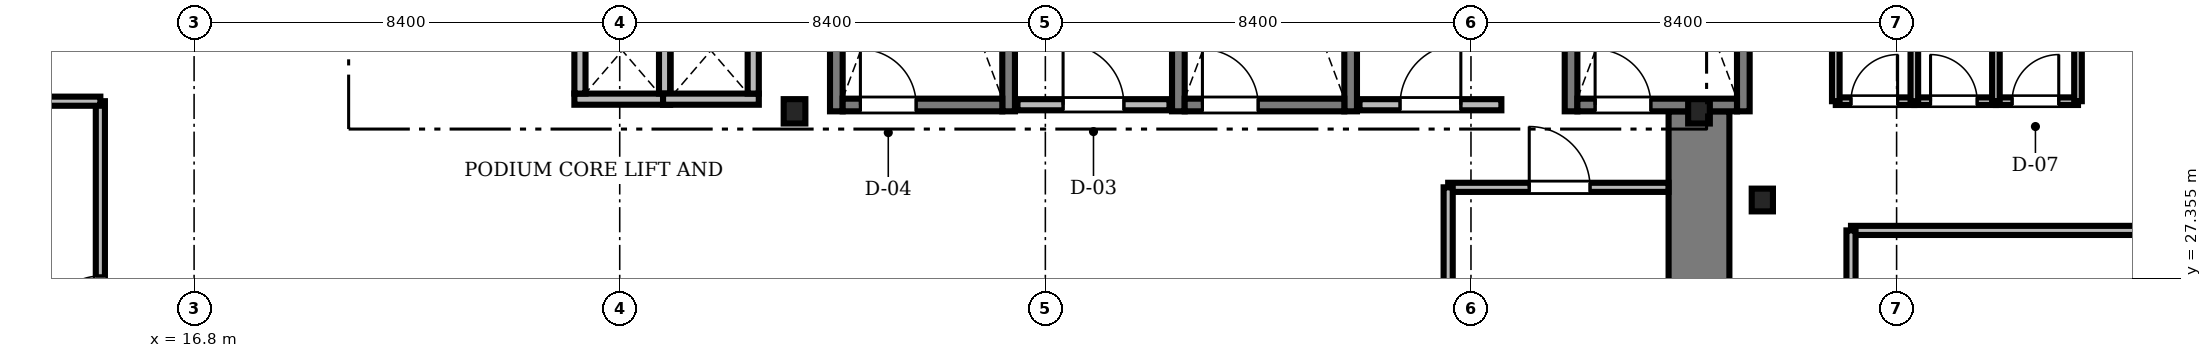
"""IFC4 building model, lengths in metres.
Left out: names, types, materials, properties, quantities, classifications, styles, units other than length and angle.
Written with IfcOpenShell. Run it as: python <this file> out.ifc"""

import sys

from ifc_helpers import new_model, si_unit, direction, frame, frame_2d, origin, origin_2d, place, context, subcontext, project, spatial, rectangle, i_section, extrude, source, transform, mapped, element, fill, save


model = new_model("IFC4")
c1 = context("Model", 3, precision=1e-05, world=origin(), true_north=direction((0.0, 1.0)))
c2 = subcontext(c1, "Body", "Model", "MODEL_VIEW")
j1 = project(units=[si_unit("LENGTHUNIT", "METRE"), si_unit("PLANEANGLEUNIT", "RADIAN")], contexts=[c1])
p1 = place(None, origin())
s1 = spatial("IfcSite", under=j1, at=p1, CompositionType="ELEMENT")
p2 = place(p1, origin())
s2 = spatial("IfcBuilding", under=s1, at=p2, CompositionType="ELEMENT")
p3 = place(p2, frame((0.0, 0.0, 17.0)))
s3 = spatial("IfcBuildingStorey", under=s2, at=p3, CompositionType="ELEMENT", Elevation=17.0)
m1 = source(origin(), c2, "Body", "SweptSolid", [
    extrude(rectangle(XDim=13.15, YDim=1.2, at=frame_2d((6.575, 0.0))), origin(), (0.0, 0.0, 1.0), 5.08),
])
p4 = place(p3, frame((46.5, 17.5, 0.0), z_axis=(0.0, 0.0, 1.0), x_axis=(0.0, 1.0, 0.0)))
e1 = element("IfcWall", 1, at=p4, inside=s3, PredefinedType="SHEAR", context=c2, shape_type="MappedRepresentation", body=[
    mapped(m1, transform((0.0, 0.0, 0.0), scale=1.0)),
])
m2 = source(origin(), c2, "Body", "SweptSolid", [
    extrude(i_section(OverallWidth=0.428, OverallDepth=0.481, WebThickness=0.04, FlangeThickness=0.063, FilletRadius=0.015, at=origin_2d()), origin(), (0.0, 0.0, 1.0), 5.08),
])
for number, where, z_axis, x_axis in (
    (2, (28.65, 30.65, 0.0), (0.0, 0.0, 1.0), (1.0, 0.0, 0.0)),
    (3, (46.5, 30.65, 0.0), (0.0, 0.0, 1.0), (1.0, 0.0, 0.0)),
):
    element("IfcColumn", number, at=place(p3, frame(where, z_axis=z_axis, x_axis=x_axis)), inside=s3, PredefinedType="COLUMN", context=c2, shape_type="MappedRepresentation", body=[
        mapped(m2, transform((0.0, 0.0, 0.0), scale=1.0)),
    ])
m3 = source(origin(), c2, "Body", "SweptSolid", [
    extrude(i_section(OverallWidth=0.419, OverallDepth=0.449, WebThickness=0.031, FlangeThickness=0.048, FilletRadius=0.015, at=origin_2d()), origin(), (0.0, 0.0, 1.0), 5.08),
])
p5 = place(p3, frame((47.75, 28.9, 0.0), z_axis=(0.0, 0.0, 1.0), x_axis=(1.0, 0.0, 0.0)))
e4 = element("IfcColumn", 4, at=p5, inside=s3, PredefinedType="COLUMN", context=c2, shape_type="MappedRepresentation", body=[
    mapped(m3, transform((0.0, 0.0, 0.0), scale=1.0)),
])
m4 = source(origin(), c2, "Body", "SweptSolid", [
    extrude(rectangle(XDim=9.05, YDim=0.25, at=frame_2d((4.525, 0.0))), origin(), (0.0, 0.0, 1.0), 5.2),
])
for number, where, z_axis, x_axis in (
    (5, (29.475, 30.65, 0.0), (0.0, 0.0, 1.0), (0.0, 1.0, 0.0)),
    (6, (32.875, 30.65, 0.0), (0.0, 0.0, 1.0), (0.0, 1.0, 0.0)),
):
    element("IfcWall", number, at=place(p3, frame(where, z_axis=z_axis, x_axis=x_axis)), inside=s3, PredefinedType="SOLIDWALL", context=c2, shape_type="MappedRepresentation", body=[
        mapped(m4, transform((0.0, 0.0, 0.0), scale=1.0)),
    ])
m5 = source(origin(), c2, "Body", "SweptSolid", [
    extrude(rectangle(XDim=3.15, YDim=0.25, at=frame_2d((1.575, 0.0))), origin(), (0.0, 0.0, 1.0), 5.2),
])
p6 = place(p3, frame((29.6, 30.775, 0.0), z_axis=(0.0, 0.0, 1.0), x_axis=(1.0, 0.0, 0.0)))
e7 = element("IfcWall", 7, at=p6, inside=s3, PredefinedType="SOLIDWALL", context=c2, shape_type="MappedRepresentation", body=[
    mapped(m5, transform((0.0, 0.0, 0.0), scale=1.0)),
])
m6 = source(origin(), c2, "Body", "SweptSolid", [
    extrude(rectangle(XDim=1.1, YDim=2.2, at=frame_2d((0.55, 1.1))), frame((0.0, 0.135, 0.0), z_axis=(0.0, -1.0, 0.0), x_axis=(1.0, 0.0, 0.0)), (0.0, 0.0, 1.0), 0.27),
])
p7 = place(p6, frame((0.35, 0.0, 0.0)))
e8 = element("IfcOpeningElement", 8, at=p7, cuts=e7, PredefinedType="OPENING", context=c2, shape_type="MappedRepresentation", body=[
    mapped(m6, transform((0.0, 0.0, 0.0), scale=1.0)),
])
for number, where, z_axis, x_axis in (
    (9, (36.225, 30.65, 0.0), (0.0, 0.0, 1.0), (0.0, 1.0, 0.0)),
    (10, (39.625, 30.65, 0.0), (0.0, 0.0, 1.0), (0.0, 1.0, 0.0)),
):
    element("IfcWall", number, at=place(p3, frame(where, z_axis=z_axis, x_axis=x_axis)), inside=s3, PredefinedType="SOLIDWALL", context=c2, shape_type="MappedRepresentation", body=[
        mapped(m4, transform((0.0, 0.0, 0.0), scale=1.0)),
    ])
p8 = place(p3, frame((36.35, 30.775, 0.0), z_axis=(0.0, 0.0, 1.0), x_axis=(1.0, 0.0, 0.0)))
e11 = element("IfcWall", 11, at=p8, inside=s3, PredefinedType="SOLIDWALL", context=c2, shape_type="MappedRepresentation", body=[
    mapped(m5, transform((0.0, 0.0, 0.0), scale=1.0)),
])
p9 = place(p8, frame((0.35, 0.0, 0.0)))
e12 = element("IfcOpeningElement", 12, at=p9, cuts=e11, PredefinedType="OPENING", context=c2, shape_type="MappedRepresentation", body=[
    mapped(m6, transform((0.0, 0.0, 0.0), scale=1.0)),
])
for number, where, z_axis, x_axis in (
    (13, (43.975, 30.65, 0.0), (0.0, 0.0, 1.0), (0.0, 1.0, 0.0)),
    (14, (47.375, 30.65, 0.0), (0.0, 0.0, 1.0), (0.0, 1.0, 0.0)),
):
    element("IfcWall", number, at=place(p3, frame(where, z_axis=z_axis, x_axis=x_axis)), inside=s3, PredefinedType="SOLIDWALL", context=c2, shape_type="MappedRepresentation", body=[
        mapped(m4, transform((0.0, 0.0, 0.0), scale=1.0)),
    ])
p10 = place(p3, frame((44.1, 30.775, 0.0), z_axis=(0.0, 0.0, 1.0), x_axis=(1.0, 0.0, 0.0)))
e15 = element("IfcWall", 15, at=p10, inside=s3, PredefinedType="SOLIDWALL", context=c2, shape_type="MappedRepresentation", body=[
    mapped(m5, transform((0.0, 0.0, 0.0), scale=1.0)),
])
p11 = place(p10, frame((0.35, 0.0, 0.0)))
e16 = element("IfcOpeningElement", 16, at=p11, cuts=e15, PredefinedType="OPENING", context=c2, shape_type="MappedRepresentation", body=[
    mapped(m6, transform((0.0, 0.0, 0.0), scale=1.0)),
])
m7 = source(origin(), c2, "Body", "SweptSolid", [
    extrude(rectangle(XDim=3.0, YDim=0.22, at=frame_2d((1.5, 0.0))), origin(), (0.0, 0.0, 1.0), 5.08),
])
p12 = place(p3, frame((33.05, 30.78, 0.0), z_axis=(0.0, 0.0, 1.0), x_axis=(1.0, 0.0, 0.0)))
e17 = element("IfcWall", 17, at=p12, inside=s3, PredefinedType="SOLIDWALL", context=c2, shape_type="MappedRepresentation", body=[
    mapped(m7, transform((0.0, 0.0, 0.0), scale=1.0)),
])
m8 = source(origin(), c2, "Body", "SweptSolid", [
    extrude(rectangle(XDim=1.2, YDim=2.2, at=frame_2d((0.6, 1.1))), frame((0.0, 0.12, 0.0), z_axis=(0.0, -1.0, 0.0), x_axis=(1.0, 0.0, 0.0)), (0.0, 0.0, 1.0), 0.24),
])
p13 = place(p12, frame((0.9, 0.0, 0.0)))
e18 = element("IfcOpeningElement", 18, at=p13, cuts=e17, PredefinedType="OPENING", context=c2, shape_type="MappedRepresentation", body=[
    mapped(m8, transform((0.0, 0.0, 0.0), scale=1.0)),
])
m9 = source(origin(), c2, "Body", "SweptSolid", [
    extrude(rectangle(XDim=2.8, YDim=0.22, at=frame_2d((1.4, 0.0))), origin(), (0.0, 0.0, 1.0), 5.08),
])
p14 = place(p3, frame((39.8, 30.78, 0.0), z_axis=(0.0, 0.0, 1.0), x_axis=(1.0, 0.0, 0.0)))
e19 = element("IfcWall", 19, at=p14, inside=s3, PredefinedType="SOLIDWALL", context=c2, shape_type="MappedRepresentation", body=[
    mapped(m9, transform((0.0, 0.0, 0.0), scale=1.0)),
])
p15 = place(p14, frame((0.8, 0.0, 0.0)))
e20 = element("IfcOpeningElement", 20, at=p15, cuts=e19, PredefinedType="OPENING", context=c2, shape_type="MappedRepresentation", body=[
    mapped(m8, transform((0.0, 0.0, 0.0), scale=1.0)),
])
m10 = source(origin(), c2, "Body", "SweptSolid", [
    extrude(rectangle(XDim=1.89, YDim=0.22, at=frame_2d((0.945, 0.0))), origin(), (0.0, 0.0, 1.0), 5.08),
])
p16 = place(p3, frame((24.305, 30.89, 0.0), z_axis=(0.0, 0.0, 1.0), x_axis=(1.0, 0.0, 0.0)))
e21 = element("IfcWall", 21, at=p16, inside=s3, PredefinedType="SOLIDWALL", context=c2, shape_type="MappedRepresentation", body=[
    mapped(m10, transform((0.0, 0.0, 0.0), scale=1.0)),
])
m11 = source(origin(), c2, "Body", "SweptSolid", [
    extrude(rectangle(XDim=1.7, YDim=0.22, at=frame_2d((0.85, 0.0))), origin(), (0.0, 0.0, 1.0), 5.08),
])
for number, where, z_axis, x_axis in (
    (22, (24.415, 31.0, 0.0), (0.0, 0.0, 1.0), (0.0, 1.0, 0.0)),
    (23, (26.085, 31.0, 0.0), (0.0, 0.0, 1.0), (0.0, 1.0, 0.0)),
):
    element("IfcWall", number, at=place(p3, frame(where, z_axis=z_axis, x_axis=x_axis)), inside=s3, PredefinedType="SOLIDWALL", context=c2, shape_type="MappedRepresentation", body=[
        mapped(m11, transform((0.0, 0.0, 0.0), scale=1.0)),
    ])
p17 = place(p3, frame((26.055, 30.89, 0.0), z_axis=(0.0, 0.0, 1.0), x_axis=(1.0, 0.0, 0.0)))
e24 = element("IfcWall", 24, at=p17, inside=s3, PredefinedType="SOLIDWALL", context=c2, shape_type="MappedRepresentation", body=[
    mapped(m10, transform((0.0, 0.0, 0.0), scale=1.0)),
])
p18 = place(p3, frame((27.835, 31.0, 0.0), z_axis=(0.0, 0.0, 1.0), x_axis=(0.0, 1.0, 0.0)))
e25 = element("IfcWall", 25, at=p18, inside=s3, PredefinedType="SOLIDWALL", context=c2, shape_type="MappedRepresentation", body=[
    mapped(m11, transform((0.0, 0.0, 0.0), scale=1.0)),
])
m12 = source(origin(), c2, "Body", "SweptSolid", [
    extrude(rectangle(XDim=8.5, YDim=0.18, at=frame_2d((4.25, 0.0))), origin(), (0.0, 0.0, 1.0), 5.08),
])
p19 = place(p3, frame((14.95, 22.35, 0.0), z_axis=(0.0, 0.0, 1.0), x_axis=(0.0, 1.0, 0.0)))
e26 = element("IfcWall", 26, at=p19, inside=s3, PredefinedType="PARTITIONING", context=c2, shape_type="MappedRepresentation", body=[
    mapped(m12, transform((0.0, 0.0, 0.0), scale=1.0)),
])
m13 = source(origin(), c2, "Body", "SweptSolid", [
    extrude(rectangle(XDim=1.05, YDim=2.2, at=frame_2d((0.525, 1.1))), frame((0.0, 0.1, 0.0), z_axis=(0.0, -1.0, 0.0), x_axis=(1.0, 0.0, 0.0)), (0.0, 0.0, 1.0), 0.2),
])
p20 = place(p19, frame((4.0, 0.0, 0.0)))
e27 = element("IfcOpeningElement", 27, at=p20, cuts=e26, PredefinedType="OPENING", context=c2, shape_type="MappedRepresentation", body=[
    mapped(m13, transform((0.0, 0.0, 0.0), scale=1.0)),
])
m14 = source(origin(), c2, "Body", "SweptSolid", [
    extrude(rectangle(XDim=4.348, YDim=0.18, at=frame_2d((2.174, 0.0))), origin(), (0.0, 0.0, 1.0), 4.712),
])
p21 = place(p3, frame((41.55, 29.15, 0.0), z_axis=(0.0, 0.0, 1.0), x_axis=(1.0, 0.0, 0.0)))
e28 = element("IfcWall", 28, at=p21, inside=s3, PredefinedType="PARTITIONING", context=c2, shape_type="MappedRepresentation", body=[
    mapped(m14, transform((0.0, 0.0, 0.0), scale=1.0)),
])
m15 = source(origin(), c2, "Body", "SweptSolid", [
    extrude(rectangle(XDim=1.2, YDim=2.2, at=frame_2d((0.6, 1.1))), frame((0.0, 0.1, 0.0), z_axis=(0.0, -1.0, 0.0), x_axis=(1.0, 0.0, 0.0)), (0.0, 0.0, 1.0), 0.2),
])
p22 = place(p21, frame((1.6, 0.0, 0.0)))
e29 = element("IfcOpeningElement", 29, at=p22, cuts=e28, PredefinedType="OPENING", context=c2, shape_type="MappedRepresentation", body=[
    mapped(m15, transform((0.0, 0.0, 0.0), scale=1.0)),
])
m16 = source(origin(), c2, "Body", "SweptSolid", [
    extrude(rectangle(XDim=1.62, YDim=0.15, at=frame_2d((0.81, 0.0))), origin(), (0.0, 0.0, 1.0), 5.08),
])
p23 = place(p3, frame((52.36, 30.85, 0.0), z_axis=(0.0, 0.0, 1.0), x_axis=(1.0, 0.0, 0.0)))
e30 = element("IfcWall", 30, at=p23, inside=s3, PredefinedType="PARTITIONING", context=c2, shape_type="MappedRepresentation", body=[
    mapped(m16, transform((0.0, 0.0, 0.0), scale=1.0)),
])
m17 = source(origin(), c2, "Body", "SweptSolid", [
    extrude(rectangle(XDim=0.92, YDim=2.1, at=frame_2d((0.46, 1.05))), frame((0.0, 0.085, 0.0), z_axis=(0.0, -1.0, 0.0), x_axis=(1.0, 0.0, 0.0)), (0.0, 0.0, 1.0), 0.17),
])
p24 = place(p23, frame((0.32, 0.0, 0.0)))
e31 = element("IfcOpeningElement", 31, at=p24, cuts=e30, PredefinedType="OPENING", context=c2, shape_type="MappedRepresentation", body=[
    mapped(m17, transform((0.0, 0.0, 0.0), scale=1.0)),
])
m18 = source(origin(), c2, "Body", "SweptSolid", [
    extrude(rectangle(XDim=1.61, YDim=0.15, at=frame_2d((0.805, 0.0))), origin(), (0.0, 0.0, 1.0), 5.08),
])
p25 = place(p3, frame((50.75, 30.85, 0.0), z_axis=(0.0, 0.0, 1.0), x_axis=(1.0, 0.0, 0.0)))
e32 = element("IfcWall", 32, at=p25, inside=s3, PredefinedType="PARTITIONING", context=c2, shape_type="MappedRepresentation", body=[
    mapped(m18, transform((0.0, 0.0, 0.0), scale=1.0)),
])
p26 = place(p25, frame((0.32, 0.0, 0.0)))
e33 = element("IfcOpeningElement", 33, at=p26, cuts=e32, PredefinedType="OPENING", context=c2, shape_type="MappedRepresentation", body=[
    mapped(m17, transform((0.0, 0.0, 0.0), scale=1.0)),
])
m19 = source(origin(), c2, "Body", "SweptSolid", [
    extrude(rectangle(XDim=1.55, YDim=0.15, at=frame_2d((0.775, 0.0))), origin(), (0.0, 0.0, 1.0), 5.08),
])
p27 = place(p3, frame((49.2, 30.85, 0.0), z_axis=(0.0, 0.0, 1.0), x_axis=(1.0, 0.0, 0.0)))
e34 = element("IfcWall", 34, at=p27, inside=s3, PredefinedType="PARTITIONING", context=c2, shape_type="MappedRepresentation", body=[
    mapped(m19, transform((0.0, 0.0, 0.0), scale=1.0)),
])
p28 = place(p27, frame((0.3, 0.0, 0.0)))
e35 = element("IfcOpeningElement", 35, at=p28, cuts=e34, PredefinedType="OPENING", context=c2, shape_type="MappedRepresentation", body=[
    mapped(m17, transform((0.0, 0.0, 0.0), scale=1.0)),
])
m20 = source(origin(), c2, "Body", "SweptSolid", [
    extrude(rectangle(XDim=14.75, YDim=0.18, at=frame_2d((7.375, 0.0))), origin(), (0.0, 0.0, 1.0), 4.472),
])
p29 = place(p3, frame((49.5, 28.3, 0.0), z_axis=(0.0, 0.0, 1.0), x_axis=(1.0, 0.0, 0.0)))
e36 = element("IfcWall", 36, at=p29, inside=s3, PredefinedType="PARTITIONING", context=c2, shape_type="MappedRepresentation", body=[
    mapped(m20, transform((0.0, 0.0, 0.0), scale=1.0)),
])
m21 = source(origin(), c2, "Body", "SweptSolid", [
    extrude(rectangle(XDim=11.75, YDim=0.18, at=frame_2d((5.875, 0.0))), origin(), (0.0, 0.0, 1.0), 4.548),
])
p30 = place(p3, frame((49.5, 16.55, 0.0), z_axis=(0.0, 0.0, 1.0), x_axis=(0.0, 1.0, 0.0)))
e37 = element("IfcWall", 37, at=p30, inside=s3, PredefinedType="PARTITIONING", context=c2, shape_type="MappedRepresentation", body=[
    mapped(m21, transform((0.0, 0.0, 0.0), scale=1.0)),
])
m22 = source(origin(), c2, "Body", "SweptSolid", [
    extrude(rectangle(XDim=11.2, YDim=0.18, at=frame_2d((5.6, 0.0))), origin(), (0.0, 0.0, 1.0), 5.08),
])
p31 = place(p3, frame((3.75, 30.85, 0.0), z_axis=(0.0, 0.0, 1.0), x_axis=(1.0, 0.0, 0.0)))
e38 = element("IfcWall", 38, at=p31, inside=s3, PredefinedType="PARTITIONING", context=c2, shape_type="MappedRepresentation", body=[
    mapped(m22, transform((0.0, 0.0, 0.0), scale=1.0)),
])
m23 = source(origin(), c2, "Body", "SweptSolid", [
    extrude(rectangle(XDim=2.65, YDim=0.15, at=frame_2d((1.325, 0.0))), origin(), (0.0, 0.0, 1.0), 5.08),
])
for number, where, z_axis, x_axis in (
    (39, (49.2, 30.85, 0.0), (0.0, 0.0, 1.0), (0.0, 1.0, 0.0)),
    (40, (50.75, 30.85, 0.0), (0.0, 0.0, 1.0), (0.0, 1.0, 0.0)),
    (41, (52.36, 30.85, 0.0), (0.0, 0.0, 1.0), (0.0, 1.0, 0.0)),
    (42, (53.98, 30.85, 0.0), (0.0, 0.0, 1.0), (0.0, 1.0, 0.0)),
):
    element("IfcWall", number, at=place(p3, frame(where, z_axis=z_axis, x_axis=x_axis)), inside=s3, PredefinedType="PARTITIONING", context=c2, shape_type="MappedRepresentation", body=[
        mapped(m23, transform((0.0, 0.0, 0.0), scale=1.0)),
    ])
m24 = source(origin(), c2, "Body", "SweptSolid", [
    extrude(rectangle(XDim=2.35, YDim=0.18, at=frame_2d((1.175, 0.0))), origin(), (0.0, 0.0, 1.0), 4.712),
])
p32 = place(p3, frame((41.55, 26.8, 0.0), z_axis=(0.0, 0.0, 1.0), x_axis=(0.0, 1.0, 0.0)))
e43 = element("IfcWall", 43, at=p32, inside=s3, PredefinedType="PARTITIONING", context=c2, shape_type="MappedRepresentation", body=[
    mapped(m24, transform((0.0, 0.0, 0.0), scale=1.0)),
])
m25 = source(origin(), c2, "Body", "SweptSolid", [
    extrude(rectangle(XDim=1.1, YDim=2.2, at=frame_2d((0.55, 1.1))), frame((0.0, 0.025, 0.0), z_axis=(0.0, -1.0, 0.0), x_axis=(1.0, 0.0, 0.0)), (0.0, 0.0, 1.0), 0.05),
])
p33 = place(p7, origin())
e44 = element("IfcDoor", 44, at=p33, inside=s3, OperationType="SINGLE_SWING_LEFT", PredefinedType="DOOR", context=c2, shape_type="MappedRepresentation", body=[
    mapped(m25, transform((0.0, 0.0, 0.0), scale=1.0)),
])
fill(e8, e44)
p34 = place(p9, origin())
e45 = element("IfcDoor", 45, at=p34, inside=s3, OperationType="SINGLE_SWING_LEFT", PredefinedType="DOOR", context=c2, shape_type="MappedRepresentation", body=[
    mapped(m25, transform((0.0, 0.0, 0.0), scale=1.0)),
])
fill(e12, e45)
p35 = place(p11, origin())
e46 = element("IfcDoor", 46, at=p35, inside=s3, OperationType="SINGLE_SWING_LEFT", PredefinedType="DOOR", context=c2, shape_type="MappedRepresentation", body=[
    mapped(m25, transform((0.0, 0.0, 0.0), scale=1.0)),
])
fill(e16, e46)
m26 = source(origin(), c2, "Body", "SweptSolid", [
    extrude(rectangle(XDim=1.2, YDim=2.2, at=frame_2d((0.6, 1.1))), frame((0.0, 0.025, 0.0), z_axis=(0.0, -1.0, 0.0), x_axis=(1.0, 0.0, 0.0)), (0.0, 0.0, 1.0), 0.05),
])
p36 = place(p13, origin())
e47 = element("IfcDoor", 47, at=p36, inside=s3, OperationType="SINGLE_SWING_LEFT", PredefinedType="DOOR", context=c2, shape_type="MappedRepresentation", body=[
    mapped(m26, transform((0.0, 0.0, 0.0), scale=1.0)),
])
fill(e18, e47)
p37 = place(p15, origin())
e48 = element("IfcDoor", 48, at=p37, inside=s3, OperationType="SINGLE_SWING_RIGHT", PredefinedType="DOOR", context=c2, shape_type="MappedRepresentation", body=[
    mapped(m26, transform((0.0, 0.0, 0.0), scale=1.0)),
])
fill(e20, e48)
m27 = source(origin(), c2, "Body", "SweptSolid", [
    extrude(rectangle(XDim=1.05, YDim=2.2, at=frame_2d((0.525, 1.1))), frame((0.0, 0.025, 0.0), z_axis=(0.0, -1.0, 0.0), x_axis=(1.0, 0.0, 0.0)), (0.0, 0.0, 1.0), 0.05),
])
p38 = place(p20, origin())
e49 = element("IfcDoor", 49, at=p38, inside=s3, OperationType="SINGLE_SWING_LEFT", PredefinedType="DOOR", context=c2, shape_type="MappedRepresentation", body=[
    mapped(m27, transform((0.0, 0.0, 0.0), scale=1.0)),
])
fill(e27, e49)
p39 = place(p22, origin())
e50 = element("IfcDoor", 50, at=p39, inside=s3, OperationType="SINGLE_SWING_LEFT", PredefinedType="DOOR", context=c2, shape_type="MappedRepresentation", body=[
    mapped(m26, transform((0.0, 0.0, 0.0), scale=1.0)),
])
fill(e29, e50)
m28 = source(origin(), c2, "Body", "SweptSolid", [
    extrude(rectangle(XDim=0.92, YDim=2.1, at=frame_2d((0.46, 1.05))), frame((0.0, 0.025, 0.0), z_axis=(0.0, -1.0, 0.0), x_axis=(1.0, 0.0, 0.0)), (0.0, 0.0, 1.0), 0.05),
])
p40 = place(p24, origin())
e51 = element("IfcDoor", 51, at=p40, inside=s3, OperationType="SINGLE_SWING_RIGHT", PredefinedType="DOOR", context=c2, shape_type="MappedRepresentation", body=[
    mapped(m28, transform((0.0, 0.0, 0.0), scale=1.0)),
])
fill(e31, e51)
p41 = place(p26, origin())
e52 = element("IfcDoor", 52, at=p41, inside=s3, OperationType="SINGLE_SWING_LEFT", PredefinedType="DOOR", context=c2, shape_type="MappedRepresentation", body=[
    mapped(m28, transform((0.0, 0.0, 0.0), scale=1.0)),
])
fill(e33, e52)
p42 = place(p28, origin())
e53 = element("IfcDoor", 53, at=p42, inside=s3, OperationType="SINGLE_SWING_RIGHT", PredefinedType="DOOR", context=c2, shape_type="MappedRepresentation", body=[
    mapped(m28, transform((0.0, 0.0, 0.0), scale=1.0)),
])
fill(e35, e53)
save(model, sys.argv[1])
